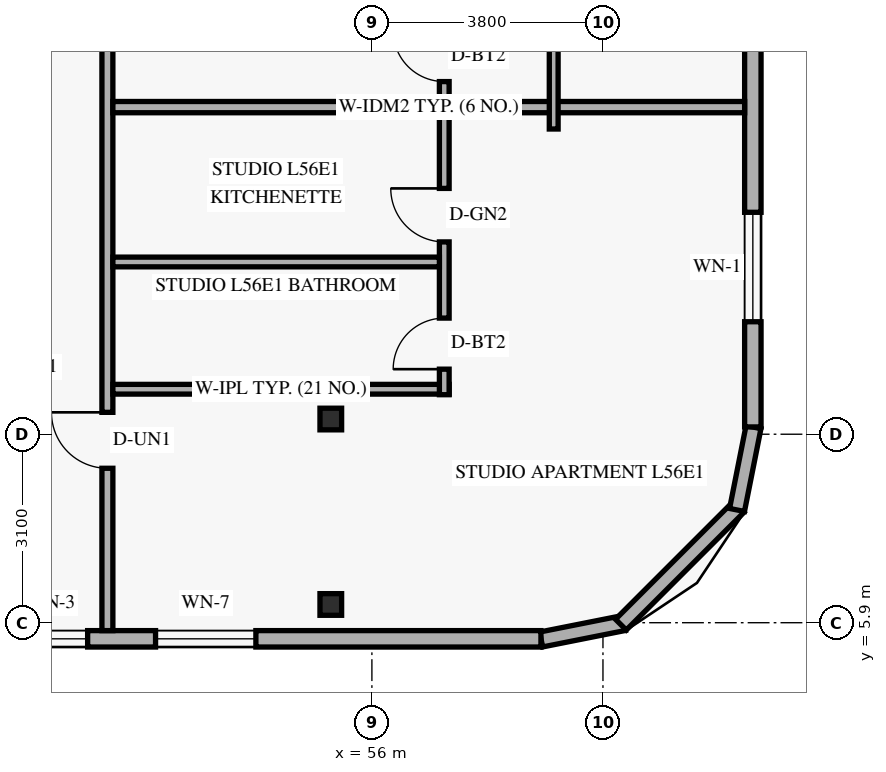
"""IFC4 building model, lengths in metres.
Left out: names, types, materials, properties, quantities, classifications, styles, units other than length and angle.
Written with IfcOpenShell. Run it as: python <this file> out.ifc"""

import sys

from ifc_helpers import new_model, si_unit, direction, frame, frame_2d, origin, origin_2d, place, context, subcontext, project, spatial, rectangle, hollow_rectangle, extrude, element, fill, save


model = new_model("IFC4")
c1 = context("Model", 3, precision=1e-05, world=origin(), true_north=direction((0.0, 1.0)))
c2 = subcontext(c1, "Body", "Model", "MODEL_VIEW")
j1 = project(units=[si_unit("LENGTHUNIT", "METRE"), si_unit("PLANEANGLEUNIT", "RADIAN")], contexts=[c1])
p1 = place(None, origin())
s1 = spatial("IfcSite", under=j1, at=p1, CompositionType="ELEMENT")
p2 = place(p1, origin())
s2 = spatial("IfcBuilding", under=s1, at=p2, CompositionType="ELEMENT")
p3 = place(p2, frame((0.0, 0.0, 216.6)))
s3 = spatial("IfcBuildingStorey", under=s2, at=p3, CompositionType="ELEMENT", Elevation=216.6)
for number, where, z_axis, x_axis in (
    (1, (55.219, 6.2, 0.0), (0.058, 0.0, 0.998), (0.0, 1.0, 0.0)),
    (2, (55.219, 9.25, 0.0), (0.058, 0.0, 0.998), (0.0, 1.0, 0.0)),
):
    element("IfcColumn", number, at=place(p3, frame(where, z_axis=z_axis, x_axis=x_axis)), inside=s3, PredefinedType="COLUMN", context=c2, shape_type="SweptSolid", body=[
        extrude(hollow_rectangle(XDim=0.356, YDim=0.356, WallThickness=0.016, at=origin_2d()), origin(), (0.0, 0.0, 1.0), 3.606),
    ])
p4 = place(p3, frame((58.783, 5.624, 0.0), z_axis=(0.0, 0.0, 1.0), x_axis=(0.980809899341, 0.19496651342, 0.0)))
e3 = element("IfcWall", 3, at=p4, inside=s3, PredefinedType="SOLIDWALL", context=c2, shape_type="SweptSolid", body=[
    extrude(rectangle(XDim=1.389, YDim=0.25, at=frame_2d((0.694, 0.0))), origin(), (0.0, 0.0, 1.0), 3.36),
])
p5 = place(p3, frame((60.095, 5.868, 0.0), z_axis=(0.0, 0.0, 1.0), x_axis=(0.707106781187, 0.707106781187, 0.0)))
e4 = element("IfcWall", 4, at=p5, inside=s3, PredefinedType="SOLIDWALL", context=c2, shape_type="SweptSolid", body=[
    extrude(rectangle(XDim=2.739, YDim=0.25, at=frame_2d((1.37, 0.0))), origin(), (0.0, 0.0, 1.0), 3.36),
])
p6 = place(p3, frame((62.005, 7.754, 0.0), z_axis=(0.0, 0.0, 1.0), x_axis=(0.195135625965, 0.9807762678, 0.0)))
e5 = element("IfcWall", 5, at=p6, inside=s3, PredefinedType="SOLIDWALL", context=c2, shape_type="SweptSolid", body=[
    extrude(rectangle(XDim=1.389, YDim=0.25, at=frame_2d((0.694, 0.0))), origin(), (0.0, 0.0, 1.0), 3.36),
])
p7 = place(p3, frame((25.82, 5.635, 0.0), z_axis=(0.0, 0.0, 1.0), x_axis=(1.0, 0.0, 0.0)))
e6 = element("IfcWall", 6, at=p7, inside=s3, PredefinedType="SOLIDWALL", context=c2, shape_type="SweptSolid", body=[
    extrude(rectangle(XDim=32.96, YDim=0.27, at=frame_2d((16.48, 0.0))), origin(), (0.0, 0.0, 1.0), 3.36),
])
p8 = place(p7, frame((3.645, 0.0, 0.85)))
e7 = element("IfcOpeningElement", 7, at=p8, cuts=e6, PredefinedType="OPENING", context=c2, shape_type="SweptSolid", body=[
    extrude(rectangle(XDim=1.65, YDim=1.6, at=frame_2d((0.825, 0.8))), frame((0.0, 0.145, 0.0), z_axis=(0.0, -1.0, 0.0), x_axis=(1.0, 0.0, 0.0)), (0.0, 0.0, 1.0), 0.29),
])
p9 = place(p7, frame((18.863, 0.0, 0.85)))
e8 = element("IfcOpeningElement", 8, at=p9, cuts=e6, PredefinedType="OPENING", context=c2, shape_type="SweptSolid", body=[
    extrude(rectangle(XDim=1.65, YDim=1.6, at=frame_2d((0.825, 0.8))), frame((0.0, 0.145, 0.0), z_axis=(0.0, -1.0, 0.0), x_axis=(1.0, 0.0, 0.0)), (0.0, 0.0, 1.0), 0.29),
])
p10 = place(p7, frame((24.305, 0.0, 0.85)))
e9 = element("IfcOpeningElement", 9, at=p10, cuts=e6, PredefinedType="OPENING", context=c2, shape_type="SweptSolid", body=[
    extrude(rectangle(XDim=1.2, YDim=1.5, at=frame_2d((0.6, 0.75))), frame((0.0, 0.145, 0.0), z_axis=(0.0, -1.0, 0.0), x_axis=(1.0, 0.0, 0.0)), (0.0, 0.0, 1.0), 0.29),
])
p11 = place(p7, frame((26.622, 0.0, 0.85)))
e10 = element("IfcOpeningElement", 10, at=p11, cuts=e6, PredefinedType="OPENING", context=c2, shape_type="SweptSolid", body=[
    extrude(rectangle(XDim=1.65, YDim=1.6, at=frame_2d((0.825, 0.8))), frame((0.0, 0.145, 0.0), z_axis=(0.0, -1.0, 0.0), x_axis=(1.0, 0.0, 0.0)), (0.0, 0.0, 1.0), 0.29),
])
p12 = place(p3, frame((62.265, 9.12, 0.0), z_axis=(0.0, 0.0, 1.0), x_axis=(0.0, 1.0, 0.0)))
e11 = element("IfcWall", 11, at=p12, inside=s3, PredefinedType="SOLIDWALL", context=c2, shape_type="SweptSolid", body=[
    extrude(rectangle(XDim=29.76, YDim=0.27, at=frame_2d((14.88, 0.0))), origin(), (0.0, 0.0, 1.0), 3.36),
])
p13 = place(p12, frame((1.73, 0.0, 0.85)))
e12 = element("IfcOpeningElement", 12, at=p13, cuts=e11, PredefinedType="OPENING", context=c2, shape_type="SweptSolid", body=[
    extrude(rectangle(XDim=1.8, YDim=1.6, at=frame_2d((0.9, 0.8))), frame((0.0, 0.145, 0.0), z_axis=(0.0, -1.0, 0.0), x_axis=(1.0, 0.0, 0.0)), (0.0, 0.0, 1.0), 0.29),
])
p14 = place(p12, frame((7.305, 0.0, 0.85)))
e13 = element("IfcOpeningElement", 13, at=p14, cuts=e11, PredefinedType="OPENING", context=c2, shape_type="SweptSolid", body=[
    extrude(rectangle(XDim=1.8, YDim=1.6, at=frame_2d((0.9, 0.8))), frame((0.0, 0.145, 0.0), z_axis=(0.0, -1.0, 0.0), x_axis=(1.0, 0.0, 0.0)), (0.0, 0.0, 1.0), 0.29),
])
p15 = place(p12, frame((12.115, 0.0, 0.85)))
e14 = element("IfcOpeningElement", 14, at=p15, cuts=e11, PredefinedType="OPENING", context=c2, shape_type="SweptSolid", body=[
    extrude(rectangle(XDim=1.8, YDim=1.6, at=frame_2d((0.9, 0.8))), frame((0.0, 0.145, 0.0), z_axis=(0.0, -1.0, 0.0), x_axis=(1.0, 0.0, 0.0)), (0.0, 0.0, 1.0), 0.29),
])
p16 = place(p12, frame((17.188, 0.0, 0.85)))
e15 = element("IfcOpeningElement", 15, at=p16, cuts=e11, PredefinedType="OPENING", context=c2, shape_type="SweptSolid", body=[
    extrude(rectangle(XDim=1.8, YDim=1.6, at=frame_2d((0.9, 0.8))), frame((0.0, 0.145, 0.0), z_axis=(0.0, -1.0, 0.0), x_axis=(1.0, 0.0, 0.0)), (0.0, 0.0, 1.0), 0.29),
])
p17 = place(p12, frame((21.997, 0.0, 0.85)))
e16 = element("IfcOpeningElement", 16, at=p17, cuts=e11, PredefinedType="OPENING", context=c2, shape_type="SweptSolid", body=[
    extrude(rectangle(XDim=1.8, YDim=1.6, at=frame_2d((0.9, 0.8))), frame((0.0, 0.145, 0.0), z_axis=(0.0, -1.0, 0.0), x_axis=(1.0, 0.0, 0.0)), (0.0, 0.0, 1.0), 0.29),
])
p18 = place(p12, frame((26.23, 0.0, 0.85)))
e17 = element("IfcOpeningElement", 17, at=p18, cuts=e11, PredefinedType="OPENING", context=c2, shape_type="SweptSolid", body=[
    extrude(rectangle(XDim=1.8, YDim=1.6, at=frame_2d((0.9, 0.8))), frame((0.0, 0.145, 0.0), z_axis=(0.0, -1.0, 0.0), x_axis=(1.0, 0.0, 0.0)), (0.0, 0.0, 1.0), 0.29),
])
p19 = place(p3, frame((51.65, 5.77, 0.0), z_axis=(0.0, 0.0, 1.0), x_axis=(0.0, 1.0, 0.0)))
e18 = element("IfcWall", 18, at=p19, inside=s3, PredefinedType="STANDARD", context=c2, shape_type="SweptSolid", body=[
    extrude(rectangle(XDim=36.46, YDim=0.18, at=frame_2d((18.23, 0.0))), origin(), (0.0, 0.0, 1.0), 2.803),
])
p20 = place(p19, frame((2.67, 0.0, 0.0)))
e19 = element("IfcOpeningElement", 19, at=p20, cuts=e18, PredefinedType="OPENING", context=c2, shape_type="SweptSolid", body=[
    extrude(rectangle(XDim=0.92, YDim=2.15, at=frame_2d((0.46, 1.075))), frame((0.0, 0.1, 0.0), z_axis=(0.0, -1.0, 0.0), x_axis=(1.0, 0.0, 0.0)), (0.0, 0.0, 1.0), 0.2),
])
p21 = place(p19, frame((13.61, 0.0, 0.0)))
e20 = element("IfcOpeningElement", 20, at=p21, cuts=e18, PredefinedType="OPENING", context=c2, shape_type="SweptSolid", body=[
    extrude(rectangle(XDim=0.92, YDim=2.15, at=frame_2d((0.46, 1.075))), frame((0.0, 0.1, 0.0), z_axis=(0.0, -1.0, 0.0), x_axis=(1.0, 0.0, 0.0)), (0.0, 0.0, 1.0), 0.2),
])
p22 = place(p19, frame((18.76, 0.0, 0.0)))
e21 = element("IfcOpeningElement", 21, at=p22, cuts=e18, PredefinedType="OPENING", context=c2, shape_type="SweptSolid", body=[
    extrude(rectangle(XDim=0.92, YDim=2.15, at=frame_2d((0.46, 1.075))), frame((0.0, 0.1, 0.0), z_axis=(0.0, -1.0, 0.0), x_axis=(1.0, 0.0, 0.0)), (0.0, 0.0, 1.0), 0.2),
])
p23 = place(p19, frame((32.75, 0.0, 0.0)))
e22 = element("IfcOpeningElement", 22, at=p23, cuts=e18, PredefinedType="OPENING", context=c2, shape_type="SweptSolid", body=[
    extrude(rectangle(XDim=0.92, YDim=2.15, at=frame_2d((0.46, 1.075))), frame((0.0, 0.1, 0.0), z_axis=(0.0, -1.0, 0.0), x_axis=(1.0, 0.0, 0.0)), (0.0, 0.0, 1.0), 0.2),
])
p24 = place(p3, frame((51.74, 9.74, 0.0), z_axis=(0.0, 0.0, 1.0), x_axis=(1.0, 0.0, 0.0)))
e23 = element("IfcWall", 23, at=p24, inside=s3, PredefinedType="PLUMBINGWALL", context=c2, shape_type="SweptSolid", body=[
    extrude(rectangle(XDim=5.53, YDim=0.16, at=frame_2d((2.765, 0.0))), origin(), (0.0, 0.0, 1.0), 2.879),
])
p25 = place(p3, frame((57.19, 9.65, 0.0), z_axis=(0.0, 0.0, 1.0), x_axis=(0.0, 1.0, 0.0)))
e24 = element("IfcWall", 24, at=p25, inside=s3, PredefinedType="PLUMBINGWALL", context=c2, shape_type="SweptSolid", body=[
    extrude(rectangle(XDim=4.73, YDim=0.16, at=frame_2d((2.365, 0.0))), origin(), (0.0, 0.0, 1.0), 3.36),
])
p26 = place(p25, frame((0.42, 0.0, 0.0)))
e25 = element("IfcOpeningElement", 25, at=p26, cuts=e24, PredefinedType="OPENING", context=c2, shape_type="SweptSolid", body=[
    extrude(rectangle(XDim=0.84, YDim=2.12, at=frame_2d((0.42, 1.06))), frame((0.0, 0.09, 0.0), z_axis=(0.0, -1.0, 0.0), x_axis=(1.0, 0.0, 0.0)), (0.0, 0.0, 1.0), 0.18),
])
p27 = place(p25, frame((2.513, 0.0, 0.0)))
e26 = element("IfcOpeningElement", 26, at=p27, cuts=e24, PredefinedType="OPENING", context=c2, shape_type="SweptSolid", body=[
    extrude(rectangle(XDim=0.88, YDim=2.12, at=frame_2d((0.44, 1.06))), frame((0.0, 0.09, 0.0), z_axis=(0.0, -1.0, 0.0), x_axis=(1.0, 0.0, 0.0)), (0.0, 0.0, 1.0), 0.18),
])
p28 = place(p3, frame((51.74, 11.833, 0.0), z_axis=(0.0, 0.0, 1.0), x_axis=(1.0, 0.0, 0.0)))
e27 = element("IfcWall", 27, at=p28, inside=s3, PredefinedType="PLUMBINGWALL", context=c2, shape_type="SweptSolid", body=[
    extrude(rectangle(XDim=5.37, YDim=0.16, at=frame_2d((2.685, 0.0))), origin(), (0.0, 0.0, 1.0), 2.879),
])
p29 = place(p3, frame((51.74, 14.38, 0.0), z_axis=(0.0, 0.0, 1.0), x_axis=(1.0, 0.0, 0.0)))
e28 = element("IfcWall", 28, at=p29, inside=s3, PredefinedType="PARTITIONING", context=c2, shape_type="SweptSolid", body=[
    extrude(rectangle(XDim=10.39, YDim=0.185, at=frame_2d((5.195, 0.0))), origin(), (0.0, 0.0, 1.0), 2.879),
])
p30 = place(p3, frame((57.19, 14.472, 0.0), z_axis=(0.0, 0.0, 1.0), x_axis=(0.0, 1.0, 0.0)))
e29 = element("IfcWall", 29, at=p30, inside=s3, PredefinedType="PLUMBINGWALL", context=c2, shape_type="SweptSolid", body=[
    extrude(rectangle(XDim=4.638, YDim=0.16, at=frame_2d((2.319, 0.0))), origin(), (0.0, 0.0, 1.0), 3.36),
])
p31 = place(p30, frame((0.327, 0.0, 0.0)))
e30 = element("IfcOpeningElement", 30, at=p31, cuts=e29, PredefinedType="OPENING", context=c2, shape_type="SweptSolid", body=[
    extrude(rectangle(XDim=0.84, YDim=2.12, at=frame_2d((0.42, 1.06))), frame((0.0, 0.09, 0.0), z_axis=(0.0, -1.0, 0.0), x_axis=(1.0, 0.0, 0.0)), (0.0, 0.0, 1.0), 0.18),
])
p32 = place(p30, frame((2.42, 0.0, 0.0)))
e31 = element("IfcOpeningElement", 31, at=p32, cuts=e29, PredefinedType="OPENING", context=c2, shape_type="SweptSolid", body=[
    extrude(rectangle(XDim=0.88, YDim=2.12, at=frame_2d((0.44, 1.06))), frame((0.0, 0.09, 0.0), z_axis=(0.0, -1.0, 0.0), x_axis=(1.0, 0.0, 0.0)), (0.0, 0.0, 1.0), 0.18),
])
p33 = place(p3, frame((58.99, 14.02, 0.0), z_axis=(0.0, 0.0, 1.0), x_axis=(0.0, 1.0, 0.0)))
e32 = element("IfcWall", 32, at=p33, inside=s3, PredefinedType="PARTITIONING", context=c2, shape_type="SweptSolid", body=[
    extrude(rectangle(XDim=6.25, YDim=0.145, at=frame_2d((3.125, 0.0))), origin(), (0.0, 0.0, 1.0), 3.36),
])
p34 = place(p10, origin())
e33 = element("IfcWindow", 33, at=p34, inside=s3, PartitioningType="SINGLE_PANEL", PredefinedType="WINDOW", context=c2, shape_type="SweptSolid", body=[
    extrude(rectangle(XDim=1.2, YDim=1.5, at=frame_2d((0.6, 0.75))), frame((0.0, 0.03, 0.0), z_axis=(0.0, -1.0, 0.0), x_axis=(1.0, 0.0, 0.0)), (0.0, 0.0, 1.0), 0.06),
])
fill(e9, e33)
p35 = place(p11, origin())
e34 = element("IfcWindow", 34, at=p35, inside=s3, PartitioningType="SINGLE_PANEL", PredefinedType="WINDOW", context=c2, shape_type="SweptSolid", body=[
    extrude(rectangle(XDim=1.65, YDim=1.6, at=frame_2d((0.825, 0.8))), frame((0.0, 0.03, 0.0), z_axis=(0.0, -1.0, 0.0), x_axis=(1.0, 0.0, 0.0)), (0.0, 0.0, 1.0), 0.06),
])
fill(e10, e34)
p36 = place(p13, origin())
e35 = element("IfcWindow", 35, at=p36, inside=s3, PartitioningType="SINGLE_PANEL", PredefinedType="WINDOW", context=c2, shape_type="SweptSolid", body=[
    extrude(rectangle(XDim=1.8, YDim=1.6, at=frame_2d((0.9, 0.8))), frame((0.0, 0.03, 0.0), z_axis=(0.0, -1.0, 0.0), x_axis=(1.0, 0.0, 0.0)), (0.0, 0.0, 1.0), 0.06),
])
fill(e12, e35)
p37 = place(p20, origin())
e36 = element("IfcDoor", 36, at=p37, inside=s3, OperationType="SINGLE_SWING_RIGHT", PredefinedType="DOOR", context=c2, shape_type="SweptSolid", body=[
    extrude(rectangle(XDim=0.92, YDim=2.15, at=frame_2d((0.46, 1.075))), frame((0.0, 0.025, 0.0), z_axis=(0.0, -1.0, 0.0), x_axis=(1.0, 0.0, 0.0)), (0.0, 0.0, 1.0), 0.05),
])
fill(e19, e36)
p38 = place(p26, origin())
e37 = element("IfcDoor", 37, at=p38, inside=s3, OperationType="SINGLE_SWING_LEFT", PredefinedType="DOOR", context=c2, shape_type="SweptSolid", body=[
    extrude(rectangle(XDim=0.84, YDim=2.12, at=frame_2d((0.42, 1.06))), frame((0.0, 0.025, 0.0), z_axis=(0.0, -1.0, 0.0), x_axis=(1.0, 0.0, 0.0)), (0.0, 0.0, 1.0), 0.05),
])
fill(e25, e37)
p39 = place(p27, origin())
e38 = element("IfcDoor", 38, at=p39, inside=s3, OperationType="SINGLE_SWING_RIGHT", PredefinedType="DOOR", context=c2, shape_type="SweptSolid", body=[
    extrude(rectangle(XDim=0.88, YDim=2.12, at=frame_2d((0.44, 1.06))), frame((0.0, 0.025, 0.0), z_axis=(0.0, -1.0, 0.0), x_axis=(1.0, 0.0, 0.0)), (0.0, 0.0, 1.0), 0.05),
])
fill(e26, e38)
p40 = place(p31, origin())
e39 = element("IfcDoor", 39, at=p40, inside=s3, OperationType="SINGLE_SWING_RIGHT", PredefinedType="DOOR", context=c2, shape_type="SweptSolid", body=[
    extrude(rectangle(XDim=0.84, YDim=2.12, at=frame_2d((0.42, 1.06))), frame((0.0, 0.025, 0.0), z_axis=(0.0, -1.0, 0.0), x_axis=(1.0, 0.0, 0.0)), (0.0, 0.0, 1.0), 0.05),
])
fill(e30, e39)
save(model, sys.argv[1])
